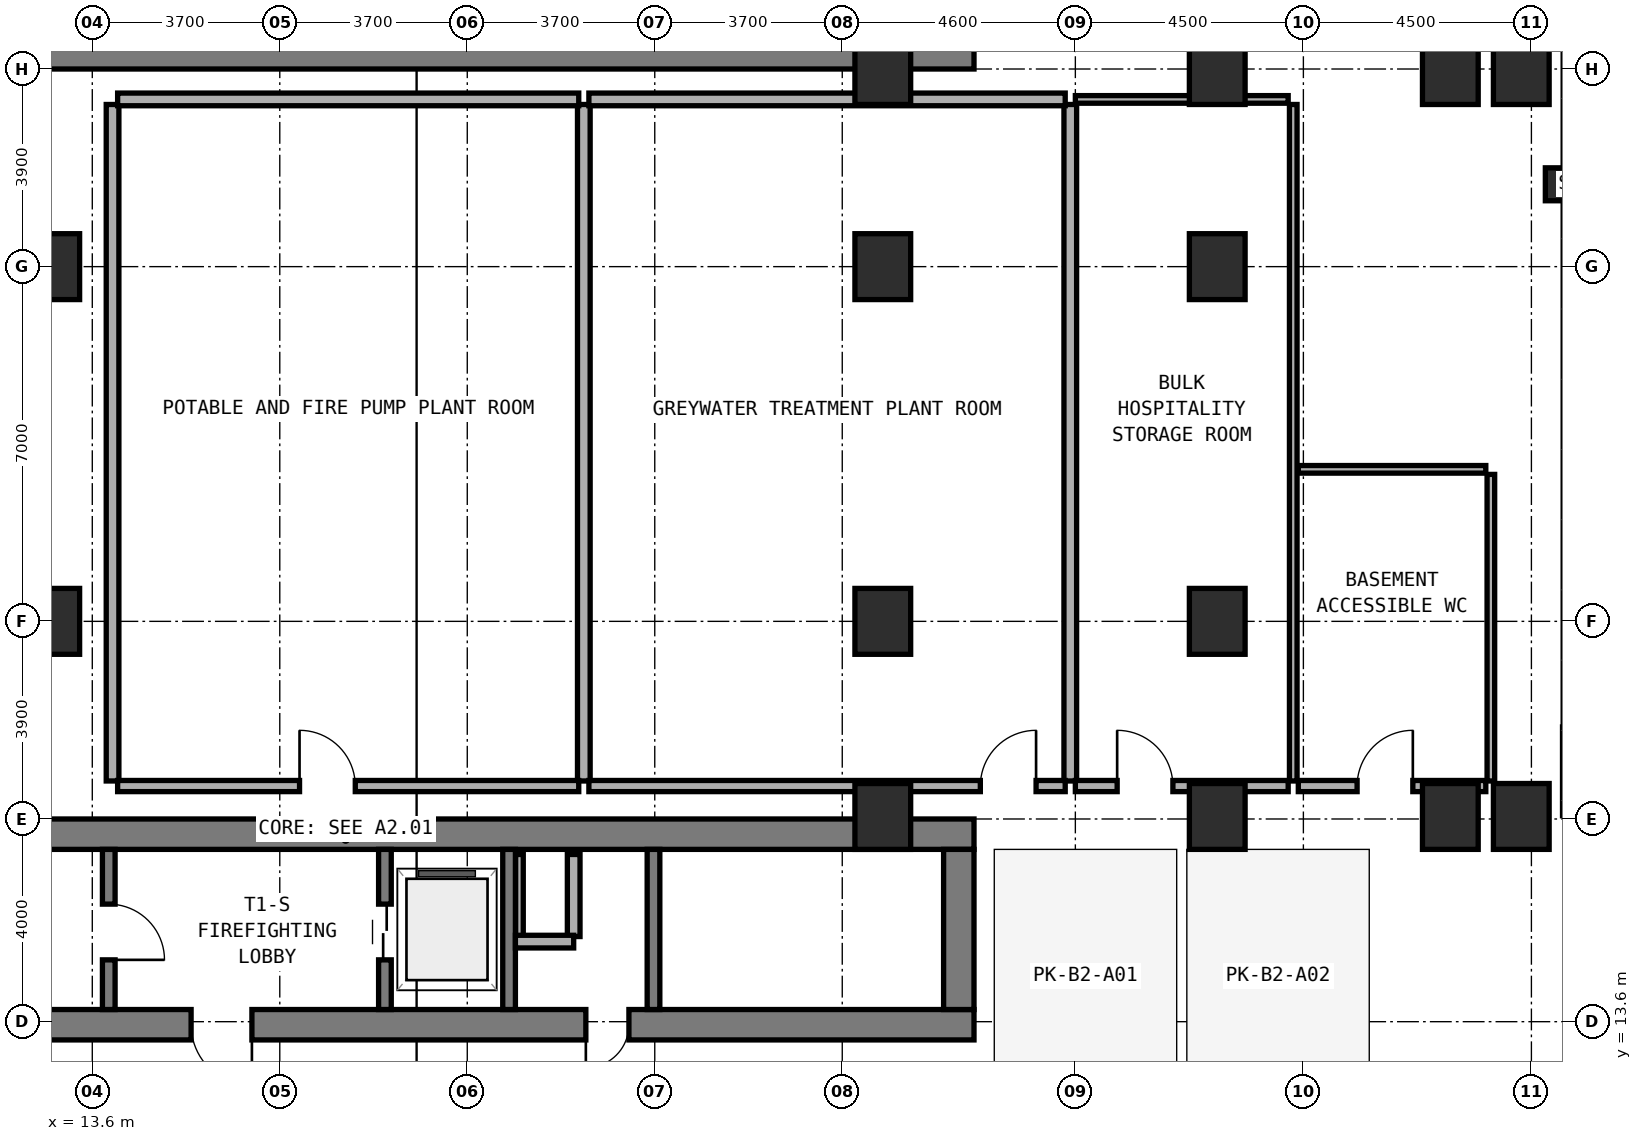
"""IFC4 building model, lengths in metres.
Left out: names, types, materials, properties, quantities, classifications, styles, units other than length and angle.
Written with IfcOpenShell. Run it as: python <this file> out.ifc"""

import sys

from ifc_helpers import new_model, si_unit, direction, frame, frame_2d, origin, origin_2d, place, context, subcontext, project, spatial, rectangle, extrude, element, fill, save


model = new_model("IFC4")
c1 = context("Model", 3, precision=1e-05, world=origin(), true_north=direction((0.0, 1.0)))
c2 = subcontext(c1, "Body", "Model", "MODEL_VIEW")
j1 = project(units=[si_unit("LENGTHUNIT", "METRE"), si_unit("PLANEANGLEUNIT", "RADIAN")], contexts=[c1])
p1 = place(None, origin())
s1 = spatial("IfcSite", under=j1, at=p1, CompositionType="ELEMENT")
p2 = place(p1, origin())
s2 = spatial("IfcBuilding", under=s1, at=p2, CompositionType="ELEMENT")
p3 = place(p2, frame((0.0, 0.0, -8.4)))
s3 = spatial("IfcBuildingStorey", under=s2, at=p3, CompositionType="ELEMENT", Elevation=-8.4)
p4 = place(p3, frame((6.2, 32.7, 0.0), z_axis=(0.0, 0.0, 1.0), x_axis=(1.0, 0.0, 0.0)))
e1 = element("IfcWall", 1, at=p4, inside=s3, PredefinedType="SHEAR", context=c2, shape_type="SweptSolid", body=[
    extrude(rectangle(XDim=24.8, YDim=0.6, at=frame_2d((12.4, 0.0))), origin(), (0.0, 0.0, 1.0), 4.2),
])
p5 = place(p3, frame((6.2, 13.54, 0.0), z_axis=(0.0, 0.0, 1.0), x_axis=(1.0, 0.0, 0.0)))
e2 = element("IfcWall", 2, at=p5, inside=s3, PredefinedType="SHEAR", context=c2, shape_type="SweptSolid", body=[
    extrude(rectangle(XDim=24.8, YDim=0.6, at=frame_2d((12.4, 0.0))), origin(), (0.0, 0.0, 1.0), 4.2),
])
p6 = place(p5, frame((9.35, 0.0, 0.0)))
e3 = element("IfcOpeningElement", 3, at=p6, cuts=e2, PredefinedType="OPENING", context=c2, shape_type="SweptSolid", body=[
    extrude(rectangle(XDim=1.2, YDim=2.15, at=frame_2d((0.6, 1.075))), frame((0.0, 0.31, 0.0), z_axis=(0.0, -1.0, 0.0), x_axis=(1.0, 0.0, 0.0)), (0.0, 0.0, 1.0), 0.62),
])
p7 = place(p5, frame((17.14, 0.0, 0.0)))
e4 = element("IfcOpeningElement", 4, at=p7, cuts=e2, PredefinedType="OPENING", context=c2, shape_type="SweptSolid", body=[
    extrude(rectangle(XDim=0.85, YDim=2.1, at=frame_2d((0.425, 1.05))), frame((0.0, 0.31, 0.0), z_axis=(0.0, -1.0, 0.0), x_axis=(1.0, 0.0, 0.0)), (0.0, 0.0, 1.0), 0.62),
])
p8 = place(p3, frame((6.2, 17.3, 0.0), z_axis=(0.0, 0.0, 1.0), x_axis=(1.0, 0.0, 0.0)))
e5 = element("IfcWall", 5, at=p8, inside=s3, PredefinedType="SHEAR", context=c2, shape_type="SweptSolid", body=[
    extrude(rectangle(XDim=24.8, YDim=0.6, at=frame_2d((12.4, 0.0))), origin(), (0.0, 0.0, 1.0), 4.2),
])
p9 = place(p3, frame((30.7, 13.84, 0.0), z_axis=(0.0, 0.0, 1.0), x_axis=(0.0, 1.0, 0.0)))
e6 = element("IfcWall", 6, at=p9, inside=s3, PredefinedType="SHEAR", context=c2, shape_type="SweptSolid", body=[
    extrude(rectangle(XDim=3.16, YDim=0.6, at=frame_2d((1.58, 0.0))), origin(), (0.0, 0.0, 1.0), 4.2),
])
p10 = place(p3, frame((13.925, 13.84, 0.0), z_axis=(0.0, 0.0, 1.0), x_axis=(0.0, 1.0, 0.0)))
e7 = element("IfcWall", 7, at=p10, inside=s3, PredefinedType="STANDARD", context=c2, shape_type="SweptSolid", body=[
    extrude(rectangle(XDim=3.16, YDim=0.25, at=frame_2d((1.58, 0.0))), origin(), (0.0, 0.0, 1.0), 3.88),
])
p11 = place(p10, frame((0.98, 0.0, 0.0)))
e8 = element("IfcOpeningElement", 8, at=p11, cuts=e7, PredefinedType="OPENING", context=c2, shape_type="SweptSolid", body=[
    extrude(rectangle(XDim=1.1, YDim=2.15, at=frame_2d((0.55, 1.075))), frame((0.0, 0.135, 0.0), z_axis=(0.0, -1.0, 0.0), x_axis=(1.0, 0.0, 0.0)), (0.0, 0.0, 1.0), 0.27),
])
p12 = place(p3, frame((19.375, 13.84, 0.0), z_axis=(0.0, 0.0, 1.0), x_axis=(0.0, 1.0, 0.0)))
e9 = element("IfcWall", 9, at=p12, inside=s3, PredefinedType="STANDARD", context=c2, shape_type="SweptSolid", body=[
    extrude(rectangle(XDim=3.16, YDim=0.25, at=frame_2d((1.58, 0.0))), origin(), (0.0, 0.0, 1.0), 3.88),
])
p13 = place(p12, frame((0.98, 0.0, 0.0)))
e10 = element("IfcOpeningElement", 10, at=p13, cuts=e9, PredefinedType="OPENING", context=c2, shape_type="SweptSolid", body=[
    extrude(rectangle(XDim=1.1, YDim=2.15, at=frame_2d((0.55, 1.075))), frame((0.0, 0.135, 0.0), z_axis=(0.0, -1.0, 0.0), x_axis=(1.0, 0.0, 0.0)), (0.0, 0.0, 1.0), 0.27),
])
for number, where, z_axis, x_axis in (
    (11, (21.825, 13.84, 0.0), (0.0, 0.0, 1.0), (0.0, 1.0, 0.0)),
    (12, (24.675, 13.84, 0.0), (0.0, 0.0, 1.0), (0.0, 1.0, 0.0)),
):
    element("IfcWall", number, at=place(p3, frame(where, z_axis=z_axis, x_axis=x_axis)), inside=s3, PredefinedType="STANDARD", context=c2, shape_type="SweptSolid", body=[
        extrude(rectangle(XDim=3.16, YDim=0.25, at=frame_2d((1.58, 0.0))), origin(), (0.0, 0.0, 1.0), 3.88),
    ])
for number, where, z_axis, x_axis in (
    (13, (35.8, 21.5, 0.0), (0.0, 0.0, 1.0), (1.0, 0.0, 0.0)),
    (14, (35.8, 28.5, 0.0), (0.0, 0.0, 1.0), (1.0, 0.0, 0.0)),
    (15, (35.8, 17.65, 0.0), (0.0, 0.0, 1.0), (1.0, 0.0, 0.0)),
    (16, (35.8, 32.35, 0.0), (0.0, 0.0, 1.0), (1.0, 0.0, 0.0)),
    (17, (12.8, 21.5, 0.0), (0.0, 0.0, 1.0), (1.0, 0.0, 0.0)),
    (18, (12.8, 28.5, 0.0), (0.0, 0.0, 1.0), (1.0, 0.0, 0.0)),
    (19, (29.2, 17.65, 0.0), (0.0, 0.0, 1.0), (1.0, 0.0, 0.0)),
    (20, (29.2, 32.35, 0.0), (0.0, 0.0, 1.0), (1.0, 0.0, 0.0)),
    (21, (29.2, 21.5, 0.0), (0.0, 0.0, 1.0), (1.0, 0.0, 0.0)),
    (22, (29.2, 28.5, 0.0), (0.0, 0.0, 1.0), (1.0, 0.0, 0.0)),
    (23, (40.4, 17.65, 0.0), (0.0, 0.0, 1.0), (1.0, 0.0, 0.0)),
    (24, (40.4, 32.35, 0.0), (0.0, 0.0, 1.0), (1.0, 0.0, 0.0)),
    (25, (41.8, 17.65, 0.0), (0.0, 0.0, 1.0), (1.0, 0.0, 0.0)),
    (26, (41.8, 32.35, 0.0), (0.0, 0.0, 1.0), (1.0, 0.0, 0.0)),
):
    element("IfcColumn", number, at=place(p3, frame(where, z_axis=z_axis, x_axis=x_axis)), inside=s3, PredefinedType="COLUMN", context=c2, shape_type="SweptSolid", body=[
        extrude(rectangle(XDim=1.1, YDim=1.3, at=origin_2d()), origin(), (0.0, 0.0, 1.0), 4.2),
    ])
p14 = place(p3, frame((42.55, 30.125, 0.0), z_axis=(0.0, 0.0, 1.0), x_axis=(1.0, 0.0, 0.0)))
e27 = element("IfcColumn", 27, at=p14, inside=s3, PredefinedType="PILASTER", context=c2, shape_type="SweptSolid", body=[
    extrude(rectangle(XDim=0.55, YDim=0.65, at=origin_2d()), origin(), (0.0, 0.0, 1.0), 1.82),
])
p15 = place(p3, frame((22.03, 15.28, 0.0), z_axis=(0.0, 0.0, 1.0), x_axis=(0.0, 1.0, 0.0)))
e28 = element("IfcWall", 28, at=p15, inside=s3, PredefinedType="PARTITIONING", context=c2, shape_type="SweptSolid", body=[
    extrude(rectangle(XDim=1.62, YDim=0.15, at=frame_2d((0.81, 0.0))), origin(), (0.0, 0.0, 1.0), 3.88),
])
p16 = place(p3, frame((23.1, 15.28, 0.0), z_axis=(0.0, 0.0, 1.0), x_axis=(0.0, 1.0, 0.0)))
e29 = element("IfcWall", 29, at=p16, inside=s3, PredefinedType="SOLIDWALL", context=c2, shape_type="SweptSolid", body=[
    extrude(rectangle(XDim=1.62, YDim=0.25, at=frame_2d((0.81, 0.0))), origin(), (0.0, 0.0, 1.0), 3.88),
])
p17 = place(p3, frame((21.95, 15.18, 0.0), z_axis=(0.0, 0.0, 1.0), x_axis=(1.0, 0.0, 0.0)))
e30 = element("IfcWall", 30, at=p17, inside=s3, PredefinedType="SOLIDWALL", context=c2, shape_type="SweptSolid", body=[
    extrude(rectangle(XDim=1.15, YDim=0.25, at=frame_2d((0.575, 0.0))), origin(), (0.0, 0.0, 1.0), 3.88),
])
for number, where, z_axis, x_axis in (
    (31, (14.0, 18.35, 0.0), (0.0, 0.0, 1.0), (0.0, 1.0, 0.0)),
    (32, (23.3, 18.35, 0.0), (0.0, 0.0, 1.0), (0.0, 1.0, 0.0)),
):
    element("IfcWall", number, at=place(p3, frame(where, z_axis=z_axis, x_axis=x_axis)), inside=s3, PredefinedType="SOLIDWALL", context=c2, shape_type="SweptSolid", body=[
        extrude(rectangle(XDim=13.35, YDim=0.25, at=frame_2d((6.675, 0.0))), origin(), (0.0, 0.0, 1.0), 3.055),
    ])
p18 = place(p3, frame((14.1, 31.8, 0.0), z_axis=(0.0, 0.0, 1.0), x_axis=(1.0, 0.0, 0.0)))
e33 = element("IfcWall", 33, at=p18, inside=s3, PredefinedType="SOLIDWALL", context=c2, shape_type="SweptSolid", body=[
    extrude(rectangle(XDim=9.1, YDim=0.25, at=frame_2d((4.55, 0.0))), origin(), (0.0, 0.0, 1.0), 3.88),
])
p19 = place(p3, frame((14.1, 18.25, 0.0), z_axis=(0.0, 0.0, 1.0), x_axis=(1.0, 0.0, 0.0)))
e34 = element("IfcWall", 34, at=p19, inside=s3, PredefinedType="SOLIDWALL", context=c2, shape_type="SweptSolid", body=[
    extrude(rectangle(XDim=9.1, YDim=0.22, at=frame_2d((4.55, 0.0))), origin(), (0.0, 0.0, 1.0), 3.88),
])
p20 = place(p19, frame((3.59, 0.0, 0.0)))
e35 = element("IfcOpeningElement", 35, at=p20, cuts=e34, PredefinedType="OPENING", context=c2, shape_type="SweptSolid", body=[
    extrude(rectangle(XDim=1.1, YDim=2.1, at=frame_2d((0.55, 1.05))), frame((0.0, 0.12, 0.0), z_axis=(0.0, -1.0, 0.0), x_axis=(1.0, 0.0, 0.0)), (0.0, 0.0, 1.0), 0.24),
])
p21 = place(p3, frame((32.9, 18.35, 0.0), z_axis=(0.0, 0.0, 1.0), x_axis=(0.0, 1.0, 0.0)))
e36 = element("IfcWall", 36, at=p21, inside=s3, PredefinedType="SOLIDWALL", context=c2, shape_type="SweptSolid", body=[
    extrude(rectangle(XDim=13.35, YDim=0.25, at=frame_2d((6.675, 0.0))), origin(), (0.0, 0.0, 1.0), 2.955),
])
p22 = place(p3, frame((23.4, 31.8, 0.0), z_axis=(0.0, 0.0, 1.0), x_axis=(1.0, 0.0, 0.0)))
e37 = element("IfcWall", 37, at=p22, inside=s3, PredefinedType="SOLIDWALL", context=c2, shape_type="SweptSolid", body=[
    extrude(rectangle(XDim=9.4, YDim=0.25, at=frame_2d((4.7, 0.0))), origin(), (0.0, 0.0, 1.0), 2.955),
])
p23 = place(p3, frame((23.4, 18.25, 0.0), z_axis=(0.0, 0.0, 1.0), x_axis=(1.0, 0.0, 0.0)))
e38 = element("IfcWall", 38, at=p23, inside=s3, PredefinedType="SOLIDWALL", context=c2, shape_type="SweptSolid", body=[
    extrude(rectangle(XDim=9.4, YDim=0.22, at=frame_2d((4.7, 0.0))), origin(), (0.0, 0.0, 1.0), 2.955),
])
p24 = place(p23, frame((7.725, 0.0, 0.0)))
e39 = element("IfcOpeningElement", 39, at=p24, cuts=e38, PredefinedType="OPENING", context=c2, shape_type="SweptSolid", body=[
    extrude(rectangle(XDim=1.1, YDim=2.1, at=frame_2d((0.55, 1.05))), frame((0.0, 0.12, 0.0), z_axis=(0.0, -1.0, 0.0), x_axis=(1.0, 0.0, 0.0)), (0.0, 0.0, 1.0), 0.24),
])
p25 = place(p3, frame((37.3, 18.35, 0.0), z_axis=(0.0, 0.0, 1.0), x_axis=(0.0, 1.0, 0.0)))
e40 = element("IfcWall", 40, at=p25, inside=s3, PredefinedType="PARTITIONING", context=c2, shape_type="SweptSolid", body=[
    extrude(rectangle(XDim=13.35, YDim=0.15, at=frame_2d((6.675, 0.0))), origin(), (0.0, 0.0, 1.0), 3.88),
])
p26 = place(p3, frame((33.0, 31.8, 0.0), z_axis=(0.0, 0.0, 1.0), x_axis=(1.0, 0.0, 0.0)))
e41 = element("IfcWall", 41, at=p26, inside=s3, PredefinedType="PARTITIONING", context=c2, shape_type="SweptSolid", body=[
    extrude(rectangle(XDim=4.2, YDim=0.15, at=frame_2d((2.1, 0.0))), origin(), (0.0, 0.0, 1.0), 3.405),
])
p27 = place(p3, frame((33.0, 18.25, 0.0), z_axis=(0.0, 0.0, 1.0), x_axis=(1.0, 0.0, 0.0)))
e42 = element("IfcWall", 42, at=p27, inside=s3, PredefinedType="SOLIDWALL", context=c2, shape_type="SweptSolid", body=[
    extrude(rectangle(XDim=4.2, YDim=0.22, at=frame_2d((2.1, 0.0))), origin(), (0.0, 0.0, 1.0), 3.405),
])
p28 = place(p27, frame((0.825, 0.0, 0.0)))
e43 = element("IfcOpeningElement", 43, at=p28, cuts=e42, PredefinedType="OPENING", context=c2, shape_type="SweptSolid", body=[
    extrude(rectangle(XDim=1.1, YDim=2.1, at=frame_2d((0.55, 1.05))), frame((0.0, 0.12, 0.0), z_axis=(0.0, -1.0, 0.0), x_axis=(1.0, 0.0, 0.0)), (0.0, 0.0, 1.0), 0.24),
])
p29 = place(p3, frame((41.2, 18.35, 0.0), z_axis=(0.0, 0.0, 1.0), x_axis=(0.0, 1.0, 0.0)))
e44 = element("IfcWall", 44, at=p29, inside=s3, PredefinedType="PARTITIONING", context=c2, shape_type="SweptSolid", body=[
    extrude(rectangle(XDim=6.05, YDim=0.15, at=frame_2d((3.025, 0.0))), origin(), (0.0, 0.0, 1.0), 3.88),
])
p30 = place(p3, frame((37.4, 24.5, 0.0), z_axis=(0.0, 0.0, 1.0), x_axis=(1.0, 0.0, 0.0)))
e45 = element("IfcWall", 45, at=p30, inside=s3, PredefinedType="PARTITIONING", context=c2, shape_type="SweptSolid", body=[
    extrude(rectangle(XDim=3.7, YDim=0.15, at=frame_2d((1.85, 0.0))), origin(), (0.0, 0.0, 1.0), 3.155),
])
p31 = place(p3, frame((37.4, 18.25, 0.0), z_axis=(0.0, 0.0, 1.0), x_axis=(1.0, 0.0, 0.0)))
e46 = element("IfcWall", 46, at=p31, inside=s3, PredefinedType="SOLIDWALL", context=c2, shape_type="SweptSolid", body=[
    extrude(rectangle(XDim=3.7, YDim=0.22, at=frame_2d((1.85, 0.0))), origin(), (0.0, 0.0, 1.0), 3.155),
])
p32 = place(p31, frame((1.16, 0.0, 0.0)))
e47 = element("IfcOpeningElement", 47, at=p32, cuts=e46, PredefinedType="OPENING", context=c2, shape_type="SweptSolid", body=[
    extrude(rectangle(XDim=1.1, YDim=2.1, at=frame_2d((0.55, 1.05))), frame((0.0, 0.12, 0.0), z_axis=(0.0, -1.0, 0.0), x_axis=(1.0, 0.0, 0.0)), (0.0, 0.0, 1.0), 0.24),
])
p33 = place(p11, frame((1.1, 0.0, 0.0), z_axis=(0.0, 0.0, 1.0), x_axis=(-1.0, 0.0, 0.0)))
e48 = element("IfcDoor", 48, at=p33, inside=s3, OperationType="SINGLE_SWING_RIGHT", PredefinedType="DOOR", context=c2, shape_type="SweptSolid", body=[
    extrude(rectangle(XDim=1.1, YDim=2.15, at=frame_2d((0.55, 1.075))), frame((0.0, 0.025, 0.0), z_axis=(0.0, -1.0, 0.0), x_axis=(1.0, 0.0, 0.0)), (0.0, 0.0, 1.0), 0.05),
])
fill(e8, e48)
p34 = place(p6, frame((1.2, 0.0, 0.0), z_axis=(0.0, 0.0, 1.0), x_axis=(-1.0, 0.0, 0.0)))
e49 = element("IfcDoor", 49, at=p34, inside=s3, OperationType="SINGLE_SWING_LEFT", PredefinedType="DOOR", context=c2, shape_type="SweptSolid", body=[
    extrude(rectangle(XDim=1.2, YDim=2.15, at=frame_2d((0.6, 1.075))), frame((0.0, 0.025, 0.0), z_axis=(0.0, -1.0, 0.0), x_axis=(1.0, 0.0, 0.0)), (0.0, 0.0, 1.0), 0.05),
])
fill(e3, e49)
p35 = place(p13, origin())
e50 = element("IfcDoor", 50, at=p35, inside=s3, OperationType="DOUBLE_DOOR_SLIDING", PredefinedType="DOOR", context=c2, shape_type="SweptSolid", body=[
    extrude(rectangle(XDim=1.1, YDim=2.15, at=frame_2d((0.55, 1.075))), frame((0.0, 0.025, 0.0), z_axis=(0.0, -1.0, 0.0), x_axis=(1.0, 0.0, 0.0)), (0.0, 0.0, 1.0), 0.05),
])
fill(e10, e50)
p36 = place(p7, frame((0.85, 0.0, 0.0), z_axis=(0.0, 0.0, 1.0), x_axis=(-1.0, 0.0, 0.0)))
e51 = element("IfcDoor", 51, at=p36, inside=s3, OperationType="SINGLE_SWING_RIGHT", PredefinedType="DOOR", context=c2, shape_type="SweptSolid", body=[
    extrude(rectangle(XDim=0.85, YDim=2.1, at=frame_2d((0.425, 1.05))), frame((0.0, 0.025, 0.0), z_axis=(0.0, -1.0, 0.0), x_axis=(1.0, 0.0, 0.0)), (0.0, 0.0, 1.0), 0.05),
])
fill(e4, e51)
p37 = place(p20, origin())
e52 = element("IfcDoor", 52, at=p37, inside=s3, OperationType="SINGLE_SWING_LEFT", PredefinedType="DOOR", context=c2, shape_type="SweptSolid", body=[
    extrude(rectangle(XDim=1.1, YDim=2.1, at=frame_2d((0.55, 1.05))), frame((0.0, 0.025, 0.0), z_axis=(0.0, -1.0, 0.0), x_axis=(1.0, 0.0, 0.0)), (0.0, 0.0, 1.0), 0.05),
])
fill(e35, e52)
p38 = place(p24, origin())
e53 = element("IfcDoor", 53, at=p38, inside=s3, OperationType="SINGLE_SWING_RIGHT", PredefinedType="DOOR", context=c2, shape_type="SweptSolid", body=[
    extrude(rectangle(XDim=1.1, YDim=2.1, at=frame_2d((0.55, 1.05))), frame((0.0, 0.025, 0.0), z_axis=(0.0, -1.0, 0.0), x_axis=(1.0, 0.0, 0.0)), (0.0, 0.0, 1.0), 0.05),
])
fill(e39, e53)
p39 = place(p28, origin())
e54 = element("IfcDoor", 54, at=p39, inside=s3, OperationType="SINGLE_SWING_LEFT", PredefinedType="DOOR", context=c2, shape_type="SweptSolid", body=[
    extrude(rectangle(XDim=1.1, YDim=2.1, at=frame_2d((0.55, 1.05))), frame((0.0, 0.025, 0.0), z_axis=(0.0, -1.0, 0.0), x_axis=(1.0, 0.0, 0.0)), (0.0, 0.0, 1.0), 0.05),
])
fill(e43, e54)
p40 = place(p32, origin())
e55 = element("IfcDoor", 55, at=p40, inside=s3, OperationType="SINGLE_SWING_RIGHT", PredefinedType="DOOR", context=c2, shape_type="SweptSolid", body=[
    extrude(rectangle(XDim=1.1, YDim=2.1, at=frame_2d((0.55, 1.05))), frame((0.0, 0.025, 0.0), z_axis=(0.0, -1.0, 0.0), x_axis=(1.0, 0.0, 0.0)), (0.0, 0.0, 1.0), 0.05),
])
fill(e47, e55)
save(model, sys.argv[1])
